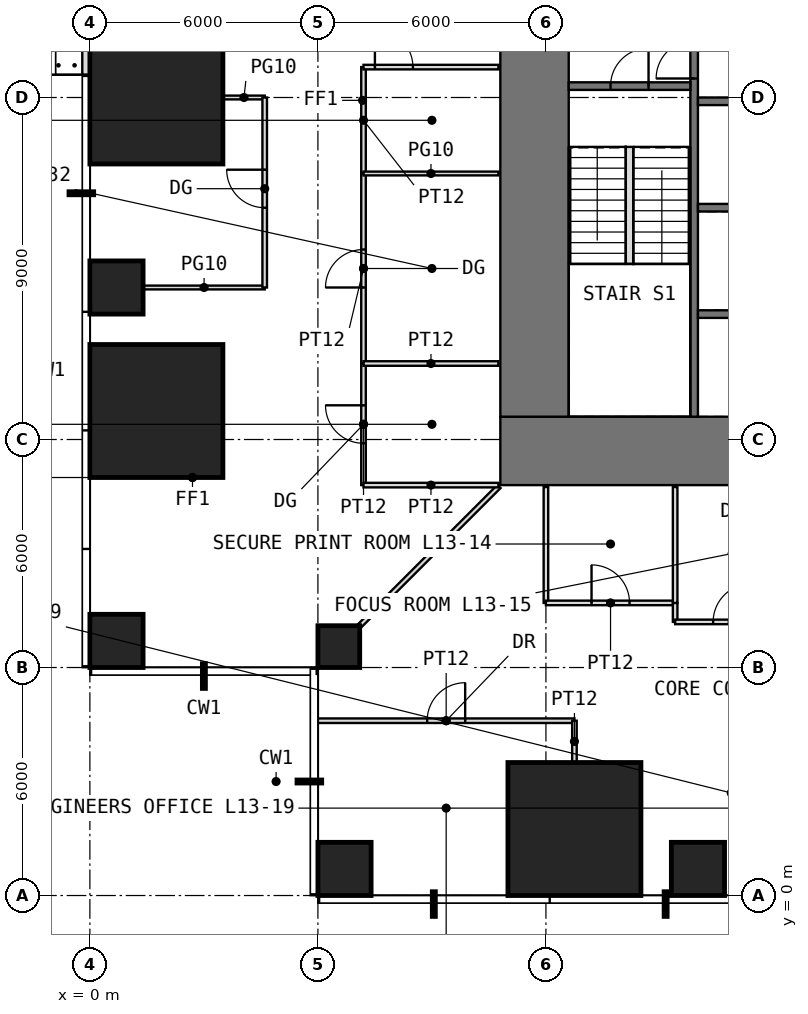
"""IFC4 building model, lengths in metres.
Left out: names, types, materials, properties, quantities, classifications, styles, units other than length and angle.
Written with IfcOpenShell. Run it as: python <this file> out.ifc"""

import sys

from ifc_helpers import new_model, si_unit, direction, frame, frame_2d, origin, origin_2d, place, context, subcontext, project, spatial, rectangle, extrude, element, fill, save


model = new_model("IFC4")
c1 = context("Model", 3, precision=1e-05, world=origin(), true_north=direction((0.0, 1.0)))
c2 = subcontext(c1, "Body", "Model", "MODEL_VIEW")
j1 = project(units=[si_unit("LENGTHUNIT", "METRE"), si_unit("PLANEANGLEUNIT", "RADIAN")], contexts=[c1])
p1 = place(None, origin())
s1 = spatial("IfcSite", under=j1, at=p1, CompositionType="ELEMENT")
p2 = place(p1, origin())
s2 = spatial("IfcBuilding", under=s1, at=p2, CompositionType="ELEMENT")
p3 = place(p2, frame((0.0, 0.0, 58.5)))
s3 = spatial("IfcBuildingStorey", under=s2, at=p3, CompositionType="ELEMENT", Elevation=58.5)
p4 = place(p3, frame((6.7, 0.7, 0.0), z_axis=(0.0, 0.0, 1.0), x_axis=(1.0, 0.0, 0.0)))
e1 = element("IfcColumn", 1, at=p4, inside=s3, PredefinedType="COLUMN", context=c2, shape_type="SweptSolid", body=[
    extrude(rectangle(XDim=1.4, YDim=1.4, at=origin_2d()), origin(), (0.0, 0.0, 1.0), 4.0),
])
p5 = place(p3, frame((12.75, 1.75, 0.0), z_axis=(0.0, 0.0, 1.0), x_axis=(1.0, 0.0, 0.0)))
e2 = element("IfcColumn", 2, at=p5, inside=s3, PredefinedType="COLUMN", context=c2, shape_type="SweptSolid", body=[
    extrude(rectangle(XDim=3.5, YDim=3.5, at=origin_2d()), origin(), (0.0, 0.0, 1.0), 4.0),
])
for number, where, z_axis, x_axis in (
    (3, (16.0, 0.7, 0.0), (0.0, 0.0, 1.0), (1.0, 0.0, 0.0)),
    (4, (0.7, 6.7, 0.0), (0.0, 0.0, 1.0), (1.0, 0.0, 0.0)),
):
    element("IfcColumn", number, at=place(p3, frame(where, z_axis=z_axis, x_axis=x_axis)), inside=s3, PredefinedType="COLUMN", context=c2, shape_type="SweptSolid", body=[
        extrude(rectangle(XDim=1.4, YDim=1.4, at=origin_2d()), origin(), (0.0, 0.0, 1.0), 4.0),
    ])
p6 = place(p3, frame((6.55, 6.55, 0.0), z_axis=(0.0, 0.0, 1.0), x_axis=(1.0, 0.0, 0.0)))
e5 = element("IfcColumn", 5, at=p6, inside=s3, PredefinedType="COLUMN", context=c2, shape_type="SweptSolid", body=[
    extrude(rectangle(XDim=1.1, YDim=1.1, at=origin_2d()), origin(), (0.0, 0.0, 1.0), 4.0),
])
p7 = place(p3, frame((1.75, 12.75, 0.0), z_axis=(0.0, 0.0, 1.0), x_axis=(1.0, 0.0, 0.0)))
e6 = element("IfcColumn", 6, at=p7, inside=s3, PredefinedType="COLUMN", context=c2, shape_type="SweptSolid", body=[
    extrude(rectangle(XDim=3.5, YDim=3.5, at=origin_2d()), origin(), (0.0, 0.0, 1.0), 4.0),
])
p8 = place(p3, frame((0.7, 16.0, 0.0), z_axis=(0.0, 0.0, 1.0), x_axis=(1.0, 0.0, 0.0)))
e7 = element("IfcColumn", 7, at=p8, inside=s3, PredefinedType="COLUMN", context=c2, shape_type="SweptSolid", body=[
    extrude(rectangle(XDim=1.4, YDim=1.4, at=origin_2d()), origin(), (0.0, 0.0, 1.0), 4.0),
])
p9 = place(p3, frame((1.75, 21.0, 0.0), z_axis=(0.0, 0.0, 1.0), x_axis=(1.0, 0.0, 0.0)))
e8 = element("IfcColumn", 8, at=p9, inside=s3, PredefinedType="COLUMN", context=c2, shape_type="SweptSolid", body=[
    extrude(rectangle(XDim=3.5, YDim=3.5, at=origin_2d()), origin(), (0.0, 0.0, 1.0), 4.0),
])
p10 = place(p3, frame((-0.1, 25.4, 0.0), z_axis=(0.0, 0.0, 1.0), x_axis=(0.0, -1.0, 0.0)))
e9 = element("IfcWall", 9, at=p10, inside=s3, PredefinedType="USERDEFINED", context=c2, shape_type="SweptSolid", body=[
    extrude(rectangle(XDim=3.8, YDim=0.2, at=frame_2d((1.9, 0.0))), origin(), (0.0, 0.0, 1.0), 3.75),
])
p11 = place(p10, frame((1.5, 0.0, 0.0)))
e10 = element("IfcOpeningElement", 10, at=p11, cuts=e9, PredefinedType="OPENING", context=c2, shape_type="SweptSolid", body=[
    extrude(rectangle(XDim=1.0, YDim=2.4, at=frame_2d((0.5, 1.2))), frame((0.0, 0.11, 0.0), z_axis=(0.0, -1.0, 0.0), x_axis=(1.0, 0.0, 0.0)), (0.0, 0.0, 1.0), 0.22),
])
p12 = place(p3, frame((10.8, 11.7, -0.05), z_axis=(0.0, 0.0, 1.0), x_axis=(1.0, 0.0, 0.0)))
e11 = element("IfcWall", 11, at=p12, inside=s3, PredefinedType="SHEAR", context=c2, shape_type="SweptSolid", body=[
    extrude(rectangle(XDim=20.4, YDim=1.8, at=frame_2d((10.2, 0.0))), origin(), (0.0, 0.0, 1.0), 4.0),
])
p13 = place(p12, frame((9.2, 0.0, 0.05)))
e12 = element("IfcOpeningElement", 12, at=p13, cuts=e11, PredefinedType="OPENING", context=c2, shape_type="SweptSolid", body=[
    extrude(rectangle(XDim=2.0, YDim=2.2, at=frame_2d((1.0, 1.1))), frame((0.0, 0.91, 0.0), z_axis=(0.0, -1.0, 0.0), x_axis=(1.0, 0.0, 0.0)), (0.0, 0.0, 1.0), 1.82),
])
p14 = place(p3, frame((11.7, 12.6, -0.05), z_axis=(0.0, 0.0, 1.0), x_axis=(0.0, 1.0, 0.0)))
e13 = element("IfcWall", 13, at=p14, inside=s3, PredefinedType="SHEAR", context=c2, shape_type="SweptSolid", body=[
    extrude(rectangle(XDim=16.8, YDim=1.8, at=frame_2d((8.4, 0.0))), origin(), (0.0, 0.0, 1.0), 4.0),
])
p15 = place(p14, frame((9.9, 0.0, 0.05)))
e14 = element("IfcOpeningElement", 14, at=p15, cuts=e13, PredefinedType="OPENING", context=c2, shape_type="SweptSolid", body=[
    extrude(rectangle(XDim=1.0, YDim=2.2, at=frame_2d((0.5, 1.1))), frame((0.0, 0.91, 0.0), z_axis=(0.0, -1.0, 0.0), x_axis=(1.0, 0.0, 0.0)), (0.0, 0.0, 1.0), 1.82),
])
p16 = place(p3, frame((15.9, 12.6, -0.05), z_axis=(0.0, 0.0, 1.0), x_axis=(0.0, 1.0, 0.0)))
e15 = element("IfcWall", 15, at=p16, inside=s3, PredefinedType="SHEAR", context=c2, shape_type="SweptSolid", body=[
    extrude(rectangle(XDim=16.8, YDim=0.2, at=frame_2d((8.4, 0.0))), origin(), (0.0, 0.0, 1.0), 4.0),
])
p17 = place(p16, frame((8.9, 0.0, 0.05)))
e16 = element("IfcOpeningElement", 16, at=p17, cuts=e15, PredefinedType="OPENING", context=c2, shape_type="SweptSolid", body=[
    extrude(rectangle(XDim=1.0, YDim=2.2, at=frame_2d((0.5, 1.1))), frame((0.0, 0.11, 0.0), z_axis=(0.0, -1.0, 0.0), x_axis=(1.0, 0.0, 0.0)), (0.0, 0.0, 1.0), 0.22),
])
p18 = place(p3, frame((12.6, 21.3, -0.05), z_axis=(0.0, 0.0, 1.0), x_axis=(1.0, 0.0, 0.0)))
e17 = element("IfcWall", 17, at=p18, inside=s3, PredefinedType="SHEAR", context=c2, shape_type="SweptSolid", body=[
    extrude(rectangle(XDim=3.2, YDim=0.2, at=frame_2d((1.6, 0.0))), origin(), (0.0, 0.0, 1.0), 4.0),
])
p19 = place(p18, frame((1.1, 0.0, 0.05)))
e18 = element("IfcOpeningElement", 18, at=p19, cuts=e17, PredefinedType="OPENING", context=c2, shape_type="SweptSolid", body=[
    extrude(rectangle(XDim=1.0, YDim=2.2, at=frame_2d((0.5, 1.1))), frame((0.0, 0.11, 0.0), z_axis=(0.0, -1.0, 0.0), x_axis=(1.0, 0.0, 0.0)), (0.0, 0.0, 1.0), 0.22),
])
for number, where, z_axis, x_axis in (
    (19, (16.0, 15.3, -0.05), (0.0, 0.0, 1.0), (1.0, 0.0, 0.0)),
    (20, (16.0, 18.1, -0.05), (0.0, 0.0, 1.0), (1.0, 0.0, 0.0)),
    (21, (16.0, 20.9, -0.05), (0.0, 0.0, 1.0), (1.0, 0.0, 0.0)),
):
    element("IfcWall", number, at=place(p3, frame(where, z_axis=z_axis, x_axis=x_axis)), inside=s3, PredefinedType="SHEAR", context=c2, shape_type="SweptSolid", body=[
        extrude(rectangle(XDim=3.2, YDim=0.2, at=frame_2d((1.6, 0.0))), origin(), (0.0, 0.0, 1.0), 4.0),
    ])
p20 = place(p3, frame((1.41, 16.0, 0.0), z_axis=(0.0, 0.0, 1.0), x_axis=(1.0, 0.0, 0.0)))
e22 = element("IfcWall", 22, at=p20, inside=s3, PredefinedType="PARTITIONING", context=c2, shape_type="SweptSolid", body=[
    extrude(rectangle(XDim=3.19, YDim=0.1, at=frame_2d((1.595, 0.0))), origin(), (0.0, 0.0, 1.0), 3.75),
])
p21 = place(p3, frame((3.51, 21.0, 0.0), z_axis=(0.0, 0.0, 1.0), x_axis=(1.0, 0.0, 0.0)))
e23 = element("IfcWall", 23, at=p21, inside=s3, PredefinedType="PARTITIONING", context=c2, shape_type="SweptSolid", body=[
    extrude(rectangle(XDim=1.09, YDim=0.1, at=frame_2d((0.545, 0.0))), origin(), (0.0, 0.0, 1.0), 3.75),
])
p22 = place(p3, frame((4.6, 16.0, 0.0), z_axis=(0.0, 0.0, 1.0), x_axis=(0.0, 1.0, 0.0)))
e24 = element("IfcWall", 24, at=p22, inside=s3, PredefinedType="PARTITIONING", context=c2, shape_type="SweptSolid", body=[
    extrude(rectangle(XDim=5.0, YDim=0.12, at=frame_2d((2.5, 0.0))), origin(), (0.0, 0.0, 1.0), 3.75),
])
p23 = place(p22, frame((2.1, 0.0, 0.0)))
e25 = element("IfcOpeningElement", 25, at=p23, cuts=e24, PredefinedType="OPENING", context=c2, shape_type="SweptSolid", body=[
    extrude(rectangle(XDim=1.0, YDim=2.4, at=frame_2d((0.5, 1.2))), frame((0.0, 0.07, 0.0), z_axis=(0.0, -1.0, 0.0), x_axis=(1.0, 0.0, 0.0)), (0.0, 0.0, 1.0), 0.14),
])
p24 = place(p3, frame((6.0, 4.6, 0.0), z_axis=(0.0, 0.0, 1.0), x_axis=(1.0, 0.0, 0.0)))
e26 = element("IfcWall", 26, at=p24, inside=s3, PredefinedType="PARTITIONING", context=c2, shape_type="SweptSolid", body=[
    extrude(rectangle(XDim=6.75, YDim=0.12, at=frame_2d((3.375, 0.0))), origin(), (0.0, 0.0, 1.0), 3.75),
])
p25 = place(p24, frame((2.875, 0.0, 0.0)))
e27 = element("IfcOpeningElement", 27, at=p25, cuts=e26, PredefinedType="OPENING", context=c2, shape_type="SweptSolid", body=[
    extrude(rectangle(XDim=1.0, YDim=2.2, at=frame_2d((0.5, 1.1))), frame((0.0, 0.07, 0.0), z_axis=(0.0, -1.0, 0.0), x_axis=(1.0, 0.0, 0.0)), (0.0, 0.0, 1.0), 0.14),
])
p26 = place(p3, frame((7.11, 7.11, 0.0), z_axis=(0.0, 0.0, 1.0), x_axis=(0.707106781187, 0.707106781187, 0.0)))
e28 = element("IfcWall", 28, at=p26, inside=s3, PredefinedType="PARTITIONING", context=c2, shape_type="SweptSolid", body=[
    extrude(rectangle(XDim=5.168, YDim=0.12, at=frame_2d((2.584, 0.0))), origin(), (0.0, 0.0, 1.0), 3.75),
])
p27 = place(p3, frame((7.2, 10.8, 0.0), z_axis=(0.0, 0.0, 1.0), x_axis=(0.0, 1.0, 0.0)))
e29 = element("IfcWall", 29, at=p27, inside=s3, PredefinedType="PARTITIONING", context=c2, shape_type="SweptSolid", body=[
    extrude(rectangle(XDim=3.2, YDim=0.12, at=frame_2d((1.6, 0.0))), origin(), (0.0, 0.0, 1.0), 3.75),
])
p28 = place(p27, frame((1.1, 0.0, 0.0)))
e30 = element("IfcOpeningElement", 30, at=p28, cuts=e29, PredefinedType="OPENING", context=c2, shape_type="SweptSolid", body=[
    extrude(rectangle(XDim=1.0, YDim=2.4, at=frame_2d((0.5, 1.2))), frame((0.0, 0.07, 0.0), z_axis=(0.0, -1.0, 0.0), x_axis=(1.0, 0.0, 0.0)), (0.0, 0.0, 1.0), 0.14),
])
p29 = place(p3, frame((7.2, 10.8, 0.0), z_axis=(0.0, 0.0, 1.0), x_axis=(1.0, 0.0, 0.0)))
e31 = element("IfcWall", 31, at=p29, inside=s3, PredefinedType="PARTITIONING", context=c2, shape_type="SweptSolid", body=[
    extrude(rectangle(XDim=3.55, YDim=0.12, at=frame_2d((1.775, 0.0))), origin(), (0.0, 0.0, 1.0), 3.75),
])
p30 = place(p3, frame((7.2, 14.0, 0.0), z_axis=(0.0, 0.0, 1.0), x_axis=(0.0, 1.0, 0.0)))
e32 = element("IfcWall", 32, at=p30, inside=s3, PredefinedType="PARTITIONING", context=c2, shape_type="SweptSolid", body=[
    extrude(rectangle(XDim=5.0, YDim=0.12, at=frame_2d((2.5, 0.0))), origin(), (0.0, 0.0, 1.0), 3.75),
])
p31 = place(p30, frame((2.0, 0.0, 0.0)))
e33 = element("IfcOpeningElement", 33, at=p31, cuts=e32, PredefinedType="OPENING", context=c2, shape_type="SweptSolid", body=[
    extrude(rectangle(XDim=1.0, YDim=2.4, at=frame_2d((0.5, 1.2))), frame((0.0, 0.07, 0.0), z_axis=(0.0, -1.0, 0.0), x_axis=(1.0, 0.0, 0.0)), (0.0, 0.0, 1.0), 0.14),
])
p32 = place(p3, frame((7.2, 14.0, 0.0), z_axis=(0.0, 0.0, 1.0), x_axis=(1.0, 0.0, 0.0)))
e34 = element("IfcWall", 34, at=p32, inside=s3, PredefinedType="PARTITIONING", context=c2, shape_type="SweptSolid", body=[
    extrude(rectangle(XDim=3.55, YDim=0.12, at=frame_2d((1.775, 0.0))), origin(), (0.0, 0.0, 1.0), 3.75),
])
p33 = place(p3, frame((7.2, 19.0, 0.0), z_axis=(0.0, 0.0, 1.0), x_axis=(0.0, 1.0, 0.0)))
e35 = element("IfcWall", 35, at=p33, inside=s3, PredefinedType="PARTITIONING", context=c2, shape_type="SweptSolid", body=[
    extrude(rectangle(XDim=2.8, YDim=0.12, at=frame_2d((1.4, 0.0))), origin(), (0.0, 0.0, 1.0), 3.75),
])
p34 = place(p3, frame((7.2, 19.0, 0.0), z_axis=(0.0, 0.0, 1.0), x_axis=(1.0, 0.0, 0.0)))
e36 = element("IfcWall", 36, at=p34, inside=s3, PredefinedType="PARTITIONING", context=c2, shape_type="SweptSolid", body=[
    extrude(rectangle(XDim=3.55, YDim=0.1, at=frame_2d((1.775, 0.0))), origin(), (0.0, 0.0, 1.0), 3.75),
])
p35 = place(p3, frame((7.2, 21.8, 0.0), z_axis=(0.0, 0.0, 1.0), x_axis=(1.0, 0.0, 0.0)))
e37 = element("IfcWall", 37, at=p35, inside=s3, PredefinedType="PARTITIONING", context=c2, shape_type="SweptSolid", body=[
    extrude(rectangle(XDim=3.55, YDim=0.12, at=frame_2d((1.775, 0.0))), origin(), (0.0, 0.0, 1.0), 3.75),
])
p36 = place(p35, frame((0.3, 0.0, 0.0)))
e38 = element("IfcOpeningElement", 38, at=p36, cuts=e37, PredefinedType="OPENING", context=c2, shape_type="SweptSolid", body=[
    extrude(rectangle(XDim=1.0, YDim=2.4, at=frame_2d((0.5, 1.2))), frame((0.0, 0.07, 0.0), z_axis=(0.0, -1.0, 0.0), x_axis=(1.0, 0.0, 0.0)), (0.0, 0.0, 1.0), 0.14),
])
p37 = place(p3, frame((12.0, 7.7, 0.0), z_axis=(0.0, 0.0, 1.0), x_axis=(0.0, 1.0, 0.0)))
e39 = element("IfcWall", 39, at=p37, inside=s3, PredefinedType="PARTITIONING", context=c2, shape_type="SweptSolid", body=[
    extrude(rectangle(XDim=3.05, YDim=0.12, at=frame_2d((1.525, 0.0))), origin(), (0.0, 0.0, 1.0), 3.75),
])
p38 = place(p3, frame((12.0, 7.7, 0.0), z_axis=(0.0, 0.0, 1.0), x_axis=(1.0, 0.0, 0.0)))
e40 = element("IfcWall", 40, at=p38, inside=s3, PredefinedType="PARTITIONING", context=c2, shape_type="SweptSolid", body=[
    extrude(rectangle(XDim=3.4, YDim=0.12, at=frame_2d((1.7, 0.0))), origin(), (0.0, 0.0, 1.0), 3.75),
])
p39 = place(p38, frame((1.2, 0.0, 0.0)))
e41 = element("IfcOpeningElement", 41, at=p39, cuts=e40, PredefinedType="OPENING", context=c2, shape_type="SweptSolid", body=[
    extrude(rectangle(XDim=1.0, YDim=2.2, at=frame_2d((0.5, 1.1))), frame((0.0, 0.07, 0.0), z_axis=(0.0, -1.0, 0.0), x_axis=(1.0, 0.0, 0.0)), (0.0, 0.0, 1.0), 0.14),
])
p40 = place(p3, frame((12.75, 3.51, 0.0), z_axis=(0.0, 0.0, 1.0), x_axis=(0.0, 1.0, 0.0)))
e42 = element("IfcWall", 42, at=p40, inside=s3, PredefinedType="PARTITIONING", context=c2, shape_type="SweptSolid", body=[
    extrude(rectangle(XDim=1.09, YDim=0.12, at=frame_2d((0.545, 0.0))), origin(), (0.0, 0.0, 1.0), 3.75),
])
p41 = place(p3, frame((15.4, 7.2, 0.0), z_axis=(0.0, 0.0, 1.0), x_axis=(0.0, 1.0, 0.0)))
e43 = element("IfcWall", 43, at=p41, inside=s3, PredefinedType="PARTITIONING", context=c2, shape_type="SweptSolid", body=[
    extrude(rectangle(XDim=0.5, YDim=0.12, at=frame_2d((0.25, 0.0))), origin(), (0.0, 0.0, 1.0), 3.75),
])
p42 = place(p3, frame((15.4, 7.2, 0.0), z_axis=(0.0, 0.0, 1.0), x_axis=(1.0, 0.0, 0.0)))
e44 = element("IfcWall", 44, at=p42, inside=s3, PredefinedType="PARTITIONING", context=c2, shape_type="SweptSolid", body=[
    extrude(rectangle(XDim=3.0, YDim=0.12, at=frame_2d((1.5, 0.0))), origin(), (0.0, 0.0, 1.0), 3.75),
])
p43 = place(p42, frame((1.0, 0.0, 0.0)))
e45 = element("IfcOpeningElement", 45, at=p43, cuts=e44, PredefinedType="OPENING", context=c2, shape_type="SweptSolid", body=[
    extrude(rectangle(XDim=1.0, YDim=2.4, at=frame_2d((0.5, 1.2))), frame((0.0, 0.07, 0.0), z_axis=(0.0, -1.0, 0.0), x_axis=(1.0, 0.0, 0.0)), (0.0, 0.0, 1.0), 0.14),
])
p44 = place(p3, frame((15.4, 7.7, 0.0), z_axis=(0.0, 0.0, 1.0), x_axis=(0.0, 1.0, 0.0)))
e46 = element("IfcWall", 46, at=p44, inside=s3, PredefinedType="PARTITIONING", context=c2, shape_type="SweptSolid", body=[
    extrude(rectangle(XDim=3.05, YDim=0.12, at=frame_2d((1.525, 0.0))), origin(), (0.0, 0.0, 1.0), 3.75),
])
p45 = place(p3, frame((14.2, 16.62, 0.0), z_axis=(0.0, 0.0, 1.0), x_axis=(0.0, 1.0, 0.0)))
e47 = element("IfcWall", 47, at=p45, inside=s3, PredefinedType="PARTITIONING", context=c2, shape_type="SweptSolid", body=[
    extrude(rectangle(XDim=3.08, YDim=0.2, at=frame_2d((1.54, 0.0))), origin(), (0.0, 0.0, 1.0), 4.0),
])
p46 = place(p19, origin())
e48 = element("IfcDoor", 48, at=p46, inside=s3, OperationType="SINGLE_SWING_RIGHT", PredefinedType="DOOR", context=c2, shape_type="SweptSolid", body=[
    extrude(rectangle(XDim=1.0, YDim=2.2, at=frame_2d((0.5, 1.1))), frame((0.0, 0.025, 0.0), z_axis=(0.0, -1.0, 0.0), x_axis=(1.0, 0.0, 0.0)), (0.0, 0.0, 1.0), 0.05),
])
fill(e18, e48)
p47 = place(p17, origin())
e49 = element("IfcDoor", 49, at=p47, inside=s3, OperationType="SINGLE_SWING_LEFT", PredefinedType="DOOR", context=c2, shape_type="SweptSolid", body=[
    extrude(rectangle(XDim=1.0, YDim=2.2, at=frame_2d((0.5, 1.1))), frame((0.0, 0.025, 0.0), z_axis=(0.0, -1.0, 0.0), x_axis=(1.0, 0.0, 0.0)), (0.0, 0.0, 1.0), 0.05),
])
fill(e16, e49)
p48 = place(p39, origin())
e50 = element("IfcDoor", 50, at=p48, inside=s3, OperationType="SINGLE_SWING_LEFT", PredefinedType="DOOR", context=c2, shape_type="SweptSolid", body=[
    extrude(rectangle(XDim=1.0, YDim=2.2, at=frame_2d((0.5, 1.1))), frame((0.0, 0.025, 0.0), z_axis=(0.0, -1.0, 0.0), x_axis=(1.0, 0.0, 0.0)), (0.0, 0.0, 1.0), 0.05),
])
fill(e41, e50)
p49 = place(p43, origin())
e51 = element("IfcDoor", 51, at=p49, inside=s3, OperationType="SINGLE_SWING_RIGHT", PredefinedType="DOOR", context=c2, shape_type="SweptSolid", body=[
    extrude(rectangle(XDim=1.0, YDim=2.4, at=frame_2d((0.5, 1.2))), frame((0.0, 0.025, 0.0), z_axis=(0.0, -1.0, 0.0), x_axis=(1.0, 0.0, 0.0)), (0.0, 0.0, 1.0), 0.05),
])
fill(e45, e51)
p50 = place(p25, origin())
e52 = element("IfcDoor", 52, at=p50, inside=s3, OperationType="SINGLE_SWING_RIGHT", PredefinedType="DOOR", context=c2, shape_type="SweptSolid", body=[
    extrude(rectangle(XDim=1.0, YDim=2.2, at=frame_2d((0.5, 1.1))), frame((0.0, 0.025, 0.0), z_axis=(0.0, -1.0, 0.0), x_axis=(1.0, 0.0, 0.0)), (0.0, 0.0, 1.0), 0.05),
])
fill(e27, e52)
p51 = place(p28, origin())
e53 = element("IfcDoor", 53, at=p51, inside=s3, OperationType="SINGLE_SWING_RIGHT", PredefinedType="DOOR", context=c2, shape_type="SweptSolid", body=[
    extrude(rectangle(XDim=1.0, YDim=2.4, at=frame_2d((0.5, 1.2))), frame((0.0, 0.025, 0.0), z_axis=(0.0, -1.0, 0.0), x_axis=(1.0, 0.0, 0.0)), (0.0, 0.0, 1.0), 0.05),
])
fill(e30, e53)
p52 = place(p31, origin())
e54 = element("IfcDoor", 54, at=p52, inside=s3, OperationType="SINGLE_SWING_LEFT", PredefinedType="DOOR", context=c2, shape_type="SweptSolid", body=[
    extrude(rectangle(XDim=1.0, YDim=2.4, at=frame_2d((0.5, 1.2))), frame((0.0, 0.025, 0.0), z_axis=(0.0, -1.0, 0.0), x_axis=(1.0, 0.0, 0.0)), (0.0, 0.0, 1.0), 0.05),
])
fill(e33, e54)
p53 = place(p23, origin())
e55 = element("IfcDoor", 55, at=p53, inside=s3, OperationType="SINGLE_SWING_RIGHT", PredefinedType="DOOR", context=c2, shape_type="SweptSolid", body=[
    extrude(rectangle(XDim=1.0, YDim=2.4, at=frame_2d((0.5, 1.2))), frame((0.0, 0.025, 0.0), z_axis=(0.0, -1.0, 0.0), x_axis=(1.0, 0.0, 0.0)), (0.0, 0.0, 1.0), 0.05),
])
fill(e25, e55)
p54 = place(p36, origin())
e56 = element("IfcDoor", 56, at=p54, inside=s3, OperationType="SINGLE_SWING_LEFT", PredefinedType="DOOR", context=c2, shape_type="SweptSolid", body=[
    extrude(rectangle(XDim=1.0, YDim=2.4, at=frame_2d((0.5, 1.2))), frame((0.0, 0.025, 0.0), z_axis=(0.0, -1.0, 0.0), x_axis=(1.0, 0.0, 0.0)), (0.0, 0.0, 1.0), 0.05),
])
fill(e38, e56)
save(model, sys.argv[1])
